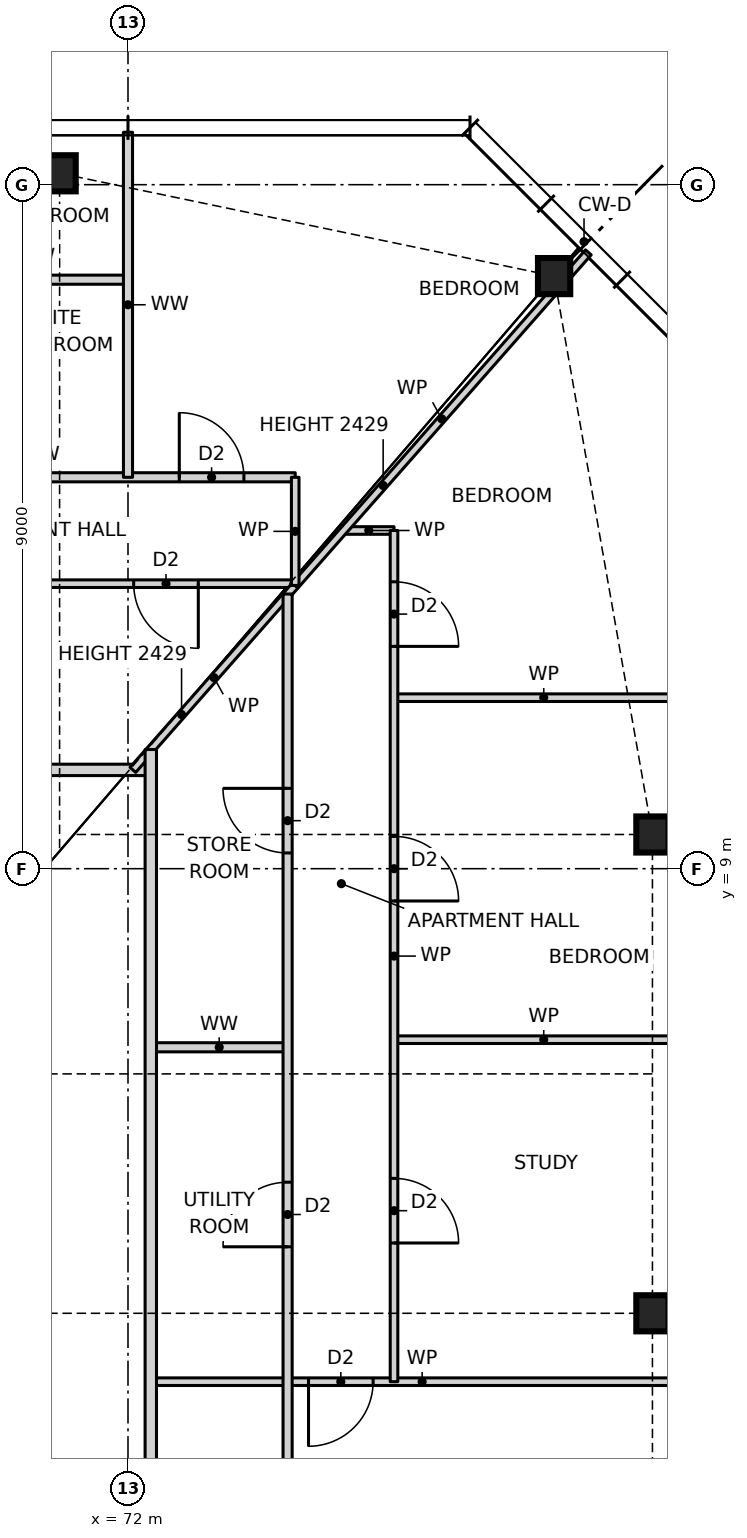
"""IFC4 building model, lengths in metres.
Left out: names, types, materials, properties, quantities, classifications, styles, units other than length and angle.
Written with IfcOpenShell. Run it as: python <this file> out.ifc"""

import sys

from ifc_helpers import new_model, si_unit, direction, frame, frame_2d, origin, origin_2d, place, context, subcontext, project, spatial, rectangle, i_section, extrude, element, fill, save


model = new_model("IFC4")
c1 = context("Model", 3, precision=1e-05, world=origin(), true_north=direction((0.0, 1.0)))
c2 = subcontext(c1, "Body", "Model", "MODEL_VIEW")
j1 = project(units=[si_unit("LENGTHUNIT", "METRE"), si_unit("PLANEANGLEUNIT", "RADIAN")], contexts=[c1])
p1 = place(None, origin())
s1 = spatial("IfcSite", under=j1, at=p1, CompositionType="ELEMENT")
p2 = place(p1, origin())
s2 = spatial("IfcBuilding", under=s1, at=p2, CompositionType="ELEMENT")
p3 = place(p2, frame((0.0, 0.0, 15.0)))
s3 = spatial("IfcBuildingStorey", under=s2, at=p3, CompositionType="ELEMENT", Elevation=15.0)
for number, where, z_axis, x_axis in (
    (1, (78.9, 3.15, 0.0), (0.0, 0.0, 1.0), (1.0, 0.0, 0.0)),
    (2, (78.9, 9.45, 0.0), (0.0, 0.0, 1.0), (1.0, 0.0, 0.0)),
    (3, (77.606, 16.797, 0.0), (0.0, 0.0, 1.0), (1.0, 0.0, 0.0)),
    (4, (71.1, 18.15, 0.0), (0.0, 0.0, 1.0), (1.0, 0.0, 0.0)),
):
    element("IfcColumn", number, at=place(p3, frame(where, z_axis=z_axis, x_axis=x_axis)), inside=s3, PredefinedType="COLUMN", context=c2, shape_type="SweptSolid", body=[
        extrude(i_section(OverallWidth=0.424, OverallDepth=0.475, WebThickness=0.048, FlangeThickness=0.077, at=origin_2d()), origin(), (0.0, 0.0, 1.0), 3.5),
    ])
p4 = place(p3, frame((72.3, 2.25, 0.0), z_axis=(0.0, 0.0, 1.0), x_axis=(1.0, 0.0, 0.0)))
e5 = element("IfcWall", 5, at=p4, inside=s3, PredefinedType="PARTITIONING", context=c2, shape_type="SweptSolid", body=[
    extrude(rectangle(XDim=7.14, YDim=0.1, at=frame_2d((3.57, 0.0))), origin(), (0.0, 0.0, 1.0), 3.27),
])
p5 = place(p4, frame((2.075, 0.0, 0.0)))
e6 = element("IfcOpeningElement", 6, at=p5, cuts=e5, PredefinedType="OPENING", context=c2, shape_type="SweptSolid", body=[
    extrude(rectangle(XDim=0.85, YDim=2.1, at=frame_2d((0.425, 1.05))), frame((0.0, 0.06, 0.0), z_axis=(0.0, -1.0, 0.0), x_axis=(1.0, 0.0, 0.0)), (0.0, 0.0, 1.0), 0.12),
])
p6 = place(p3, frame((72.3, 6.65, 0.0), z_axis=(0.0, 0.0, 1.0), x_axis=(1.0, 0.0, 0.0)))
e7 = element("IfcWall", 7, at=p6, inside=s3, PredefinedType="PARTITIONING", context=c2, shape_type="SweptSolid", body=[
    extrude(rectangle(XDim=1.8, YDim=0.12, at=frame_2d((0.9, 0.0))), origin(), (0.0, 0.0, 1.0), 3.27),
])
p7 = place(p3, frame((75.5, 6.75, 0.0), z_axis=(0.0, 0.0, 1.0), x_axis=(1.0, 0.0, 0.0)))
e8 = element("IfcWall", 8, at=p7, inside=s3, PredefinedType="PARTITIONING", context=c2, shape_type="SweptSolid", body=[
    extrude(rectangle(XDim=3.94, YDim=0.1, at=frame_2d((1.97, 0.0))), origin(), (0.0, 0.0, 1.0), 3.27),
])
p8 = place(p3, frame((53.7, 10.3, 0.0), z_axis=(0.0, 0.0, 1.0), x_axis=(1.0, 0.0, 0.0)))
e9 = element("IfcWall", 9, at=p8, inside=s3, PredefinedType="PARTITIONING", context=c2, shape_type="SweptSolid", body=[
    extrude(rectangle(XDim=18.6, YDim=0.15, at=frame_2d((9.3, 0.0))), origin(), (0.0, 0.0, 1.0), 3.27),
])
p9 = place(p8, frame((8.3, 0.0, 0.0)))
e10 = element("IfcOpeningElement", 10, at=p9, cuts=e9, PredefinedType="OPENING", context=c2, shape_type="SweptSolid", body=[
    extrude(rectangle(XDim=1.0, YDim=2.1, at=frame_2d((0.5, 1.05))), frame((0.0, 0.085, 0.0), z_axis=(0.0, -1.0, 0.0), x_axis=(1.0, 0.0, 0.0)), (0.0, 0.0, 1.0), 0.17),
])
p10 = place(p3, frame((75.5, 11.25, 0.0), z_axis=(0.0, 0.0, 1.0), x_axis=(1.0, 0.0, 0.0)))
e11 = element("IfcWall", 11, at=p10, inside=s3, PredefinedType="PARTITIONING", context=c2, shape_type="SweptSolid", body=[
    extrude(rectangle(XDim=3.94, YDim=0.1, at=frame_2d((1.97, 0.0))), origin(), (0.0, 0.0, 1.0), 3.27),
])
p11 = place(p3, frame((51.8, 12.75, 0.0), z_axis=(0.0, 0.0, 1.0), x_axis=(1.0, 0.0, 0.0)))
e12 = element("IfcWall", 12, at=p11, inside=s3, PredefinedType="PARTITIONING", context=c2, shape_type="SweptSolid", body=[
    extrude(rectangle(XDim=22.4, YDim=0.1, at=frame_2d((11.2, 0.0))), origin(), (0.0, 0.0, 1.0), 3.27),
])
p12 = place(p11, frame((13.475, 0.0, 0.0)))
e13 = element("IfcOpeningElement", 13, at=p12, cuts=e12, PredefinedType="OPENING", context=c2, shape_type="SweptSolid", body=[
    extrude(rectangle(XDim=0.85, YDim=2.1, at=frame_2d((0.425, 1.05))), frame((0.0, 0.06, 0.0), z_axis=(0.0, -1.0, 0.0), x_axis=(1.0, 0.0, 0.0)), (0.0, 0.0, 1.0), 0.12),
])
p13 = place(p11, frame((10.275, 0.0, 0.0)))
e14 = element("IfcOpeningElement", 14, at=p13, cuts=e12, PredefinedType="OPENING", context=c2, shape_type="SweptSolid", body=[
    extrude(rectangle(XDim=0.85, YDim=2.1, at=frame_2d((0.425, 1.05))), frame((0.0, 0.06, 0.0), z_axis=(0.0, -1.0, 0.0), x_axis=(1.0, 0.0, 0.0)), (0.0, 0.0, 1.0), 0.12),
])
p14 = place(p11, frame((16.925, 0.0, 0.0)))
e15 = element("IfcOpeningElement", 15, at=p14, cuts=e12, PredefinedType="OPENING", context=c2, shape_type="SweptSolid", body=[
    extrude(rectangle(XDim=0.85, YDim=2.1, at=frame_2d((0.425, 1.05))), frame((0.0, 0.06, 0.0), z_axis=(0.0, -1.0, 0.0), x_axis=(1.0, 0.0, 0.0)), (0.0, 0.0, 1.0), 0.12),
])
p15 = place(p11, frame((20.275, 0.0, 0.0)))
e16 = element("IfcOpeningElement", 16, at=p15, cuts=e12, PredefinedType="OPENING", context=c2, shape_type="SweptSolid", body=[
    extrude(rectangle(XDim=0.85, YDim=2.1, at=frame_2d((0.425, 1.05))), frame((0.0, 0.06, 0.0), z_axis=(0.0, -1.0, 0.0), x_axis=(1.0, 0.0, 0.0)), (0.0, 0.0, 1.0), 0.12),
])
p16 = place(p11, frame((4.625, 0.0, 0.0)))
e17 = element("IfcOpeningElement", 17, at=p16, cuts=e12, PredefinedType="OPENING", context=c2, shape_type="SweptSolid", body=[
    extrude(rectangle(XDim=0.85, YDim=2.1, at=frame_2d((0.425, 1.05))), frame((0.0, 0.06, 0.0), z_axis=(0.0, -1.0, 0.0), x_axis=(1.0, 0.0, 0.0)), (0.0, 0.0, 1.0), 0.12),
])
p17 = place(p11, frame((1.275, 0.0, 0.0)))
e18 = element("IfcOpeningElement", 18, at=p17, cuts=e12, PredefinedType="OPENING", context=c2, shape_type="SweptSolid", body=[
    extrude(rectangle(XDim=0.85, YDim=2.1, at=frame_2d((0.425, 1.05))), frame((0.0, 0.06, 0.0), z_axis=(0.0, -1.0, 0.0), x_axis=(1.0, 0.0, 0.0)), (0.0, 0.0, 1.0), 0.12),
])
p18 = place(p3, frame((74.836, 13.45, 0.0), z_axis=(0.0, 0.0, 1.0), x_axis=(1.0, 0.0, 0.0)))
e19 = element("IfcWall", 19, at=p18, inside=s3, PredefinedType="PARTITIONING", context=c2, shape_type="SweptSolid", body=[
    extrude(rectangle(XDim=0.664, YDim=0.1, at=frame_2d((0.332, 0.0))), origin(), (0.0, 0.0, 1.0), 3.27),
])
p19 = place(p3, frame((67.5, 14.15, 0.0), z_axis=(0.0, 0.0, 1.0), x_axis=(1.0, 0.0, 0.0)))
e20 = element("IfcWall", 20, at=p19, inside=s3, PredefinedType="PARTITIONING", context=c2, shape_type="SweptSolid", body=[
    extrude(rectangle(XDim=6.7, YDim=0.12, at=frame_2d((3.35, 0.0))), origin(), (0.0, 0.0, 1.0), 3.27),
])
p20 = place(p19, frame((0.625, 0.0, 0.0)))
e21 = element("IfcOpeningElement", 21, at=p20, cuts=e20, PredefinedType="OPENING", context=c2, shape_type="SweptSolid", body=[
    extrude(rectangle(XDim=0.85, YDim=2.1, at=frame_2d((0.425, 1.05))), frame((0.0, 0.07, 0.0), z_axis=(0.0, -1.0, 0.0), x_axis=(1.0, 0.0, 0.0)), (0.0, 0.0, 1.0), 0.14),
])
p21 = place(p19, frame((5.175, 0.0, 0.0)))
e22 = element("IfcOpeningElement", 22, at=p21, cuts=e20, PredefinedType="OPENING", context=c2, shape_type="SweptSolid", body=[
    extrude(rectangle(XDim=0.85, YDim=2.1, at=frame_2d((0.425, 1.05))), frame((0.0, 0.07, 0.0), z_axis=(0.0, -1.0, 0.0), x_axis=(1.0, 0.0, 0.0)), (0.0, 0.0, 1.0), 0.14),
])
p22 = place(p3, frame((69.6, 16.75, 0.0), z_axis=(0.0, 0.0, 1.0), x_axis=(1.0, 0.0, 0.0)))
e23 = element("IfcWall", 23, at=p22, inside=s3, PredefinedType="PARTITIONING", context=c2, shape_type="SweptSolid", body=[
    extrude(rectangle(XDim=2.4, YDim=0.12, at=frame_2d((1.2, 0.0))), origin(), (0.0, 0.0, 1.0), 3.27),
])
p23 = place(p3, frame((72.064, 10.3, 0.0), z_axis=(0.0, 0.0, 1.0), x_axis=(0.660667046586, 0.75067906162, 0.0)))
e24 = element("IfcWall", 24, at=p23, inside=s3, PredefinedType="PARTITIONING", context=c2, shape_type="SweptSolid", body=[
    extrude(rectangle(XDim=3.233, YDim=0.1, at=frame_2d((1.617, 0.0))), origin(), (0.0, 0.0, 1.0), 2.429),
])
p24 = place(p3, frame((74.2, 12.727, 0.0), z_axis=(0.0, 0.0, 1.0), x_axis=(0.660698595885, 0.750651294141, 0.0)))
e25 = element("IfcWall", 25, at=p24, inside=s3, PredefinedType="PARTITIONING", context=c2, shape_type="SweptSolid", body=[
    extrude(rectangle(XDim=5.838, YDim=0.1, at=frame_2d((2.919, 0.0))), origin(), (0.0, 0.0, 1.0), 2.429),
])
p25 = place(p3, frame((75.5, 2.25, 0.0), z_axis=(0.0, 0.0, 1.0), x_axis=(0.0, 1.0, 0.0)))
e26 = element("IfcWall", 26, at=p25, inside=s3, PredefinedType="PARTITIONING", context=c2, shape_type="SweptSolid", body=[
    extrude(rectangle(XDim=11.2, YDim=0.1, at=frame_2d((5.6, 0.0))), origin(), (0.0, 0.0, 1.0), 3.27),
])
p26 = place(p25, frame((1.825, 0.0, 0.0)))
e27 = element("IfcOpeningElement", 27, at=p26, cuts=e26, PredefinedType="OPENING", context=c2, shape_type="SweptSolid", body=[
    extrude(rectangle(XDim=0.85, YDim=2.1, at=frame_2d((0.425, 1.05))), frame((0.0, 0.06, 0.0), z_axis=(0.0, -1.0, 0.0), x_axis=(1.0, 0.0, 0.0)), (0.0, 0.0, 1.0), 0.12),
])
p27 = place(p25, frame((6.325, 0.0, 0.0)))
e28 = element("IfcOpeningElement", 28, at=p27, cuts=e26, PredefinedType="OPENING", context=c2, shape_type="SweptSolid", body=[
    extrude(rectangle(XDim=0.85, YDim=2.1, at=frame_2d((0.425, 1.05))), frame((0.0, 0.06, 0.0), z_axis=(0.0, -1.0, 0.0), x_axis=(1.0, 0.0, 0.0)), (0.0, 0.0, 1.0), 0.12),
])
p28 = place(p25, frame((9.675, 0.0, 0.0)))
e29 = element("IfcOpeningElement", 29, at=p28, cuts=e26, PredefinedType="OPENING", context=c2, shape_type="SweptSolid", body=[
    extrude(rectangle(XDim=0.85, YDim=2.1, at=frame_2d((0.425, 1.05))), frame((0.0, 0.06, 0.0), z_axis=(0.0, -1.0, 0.0), x_axis=(1.0, 0.0, 0.0)), (0.0, 0.0, 1.0), 0.12),
])
p29 = place(p3, frame((74.2, 12.727, 0.0), z_axis=(0.0, 0.0, 1.0), x_axis=(0.0, 1.0, 0.0)))
e30 = element("IfcWall", 30, at=p29, inside=s3, PredefinedType="PARTITIONING", context=c2, shape_type="SweptSolid", body=[
    extrude(rectangle(XDim=1.423, YDim=0.1, at=frame_2d((0.711, 0.0))), origin(), (0.0, 0.0, 1.0), 3.27),
])
p30 = place(p3, frame((74.1, -12.614, 0.0), z_axis=(0.0, 0.0, 1.0), x_axis=(0.0, 1.0, 0.0)))
e31 = element("IfcWall", 31, at=p30, inside=s3, PredefinedType="PARTITIONING", context=c2, shape_type="SweptSolid", body=[
    extrude(rectangle(XDim=25.228, YDim=0.12, at=frame_2d((12.614, 0.0))), origin(), (0.0, 0.0, 1.0), 3.27),
])
p31 = place(p30, frame((7.239, 0.0, 0.0)))
e32 = element("IfcOpeningElement", 32, at=p31, cuts=e31, PredefinedType="OPENING", context=c2, shape_type="SweptSolid", body=[
    extrude(rectangle(XDim=0.85, YDim=2.1, at=frame_2d((0.425, 1.05))), frame((0.0, 0.07, 0.0), z_axis=(0.0, -1.0, 0.0), x_axis=(1.0, 0.0, 0.0)), (0.0, 0.0, 1.0), 0.14),
])
p32 = place(p30, frame((10.439, 0.0, 0.0)))
e33 = element("IfcOpeningElement", 33, at=p32, cuts=e31, PredefinedType="OPENING", context=c2, shape_type="SweptSolid", body=[
    extrude(rectangle(XDim=0.85, YDim=2.1, at=frame_2d((0.425, 1.05))), frame((0.0, 0.07, 0.0), z_axis=(0.0, -1.0, 0.0), x_axis=(1.0, 0.0, 0.0)), (0.0, 0.0, 1.0), 0.14),
])
p33 = place(p30, frame((2.507, 0.0, 0.0)))
e34 = element("IfcOpeningElement", 34, at=p33, cuts=e31, PredefinedType="OPENING", context=c2, shape_type="SweptSolid", body=[
    extrude(rectangle(XDim=0.85, YDim=2.1, at=frame_2d((0.425, 1.05))), frame((0.0, 0.07, 0.0), z_axis=(0.0, -1.0, 0.0), x_axis=(1.0, 0.0, 0.0)), (0.0, 0.0, 1.0), 0.14),
])
p34 = place(p30, frame((16.639, 0.0, 0.0)))
e35 = element("IfcOpeningElement", 35, at=p34, cuts=e31, PredefinedType="OPENING", context=c2, shape_type="SweptSolid", body=[
    extrude(rectangle(XDim=0.85, YDim=2.1, at=frame_2d((0.425, 1.05))), frame((0.0, 0.07, 0.0), z_axis=(0.0, -1.0, 0.0), x_axis=(1.0, 0.0, 0.0)), (0.0, 0.0, 1.0), 0.14),
])
p35 = place(p30, frame((21.821, 0.0, 0.0)))
e36 = element("IfcOpeningElement", 36, at=p35, cuts=e31, PredefinedType="OPENING", context=c2, shape_type="SweptSolid", body=[
    extrude(rectangle(XDim=0.85, YDim=2.1, at=frame_2d((0.425, 1.05))), frame((0.0, 0.07, 0.0), z_axis=(0.0, -1.0, 0.0), x_axis=(1.0, 0.0, 0.0)), (0.0, 0.0, 1.0), 0.14),
])
p36 = place(p3, frame((72.3, -10.9, 0.0), z_axis=(0.0, 0.0, 1.0), x_axis=(0.0, 1.0, 0.0)))
e37 = element("IfcWall", 37, at=p36, inside=s3, PredefinedType="PARTITIONING", context=c2, shape_type="SweptSolid", body=[
    extrude(rectangle(XDim=21.468, YDim=0.15, at=frame_2d((10.734, 0.0))), origin(), (0.0, 0.0, 1.0), 3.27),
])
p37 = place(p36, frame((8.65, 0.0, 0.0)))
e38 = element("IfcOpeningElement", 38, at=p37, cuts=e37, PredefinedType="OPENING", context=c2, shape_type="SweptSolid", body=[
    extrude(rectangle(XDim=1.0, YDim=2.1, at=frame_2d((0.5, 1.05))), frame((0.0, 0.085, 0.0), z_axis=(0.0, -1.0, 0.0), x_axis=(1.0, 0.0, 0.0)), (0.0, 0.0, 1.0), 0.17),
])
p38 = place(p3, frame((72.0, 14.15, 0.0), z_axis=(0.0, 0.0, 1.0), x_axis=(0.0, 1.0, 0.0)))
e39 = element("IfcWall", 39, at=p38, inside=s3, PredefinedType="PARTITIONING", context=c2, shape_type="SweptSolid", body=[
    extrude(rectangle(XDim=4.54, YDim=0.12, at=frame_2d((2.27, 0.0))), origin(), (0.0, 0.0, 1.0), 3.27),
])
p39 = place(p5, frame((0.85, 0.0, 0.0), z_axis=(0.0, 0.0, 1.0), x_axis=(-1.0, 0.0, 0.0)))
e40 = element("IfcDoor", 40, at=p39, inside=s3, OperationType="SINGLE_SWING_RIGHT", PredefinedType="DOOR", context=c2, shape_type="SweptSolid", body=[
    extrude(rectangle(XDim=0.85, YDim=2.1, at=frame_2d((0.425, 1.05))), frame((0.0, 0.025, 0.0), z_axis=(0.0, -1.0, 0.0), x_axis=(1.0, 0.0, 0.0)), (0.0, 0.0, 1.0), 0.05),
])
fill(e6, e40)
p40 = place(p26, frame((0.85, 0.0, 0.0), z_axis=(0.0, 0.0, 1.0), x_axis=(-1.0, 0.0, 0.0)))
e41 = element("IfcDoor", 41, at=p40, inside=s3, OperationType="SINGLE_SWING_RIGHT", PredefinedType="DOOR", context=c2, shape_type="SweptSolid", body=[
    extrude(rectangle(XDim=0.85, YDim=2.1, at=frame_2d((0.425, 1.05))), frame((0.0, 0.025, 0.0), z_axis=(0.0, -1.0, 0.0), x_axis=(1.0, 0.0, 0.0)), (0.0, 0.0, 1.0), 0.05),
])
fill(e27, e41)
p41 = place(p27, frame((0.85, 0.0, 0.0), z_axis=(0.0, 0.0, 1.0), x_axis=(-1.0, 0.0, 0.0)))
e42 = element("IfcDoor", 42, at=p41, inside=s3, OperationType="SINGLE_SWING_RIGHT", PredefinedType="DOOR", context=c2, shape_type="SweptSolid", body=[
    extrude(rectangle(XDim=0.85, YDim=2.1, at=frame_2d((0.425, 1.05))), frame((0.0, 0.025, 0.0), z_axis=(0.0, -1.0, 0.0), x_axis=(1.0, 0.0, 0.0)), (0.0, 0.0, 1.0), 0.05),
])
fill(e28, e42)
p42 = place(p28, frame((0.85, 0.0, 0.0), z_axis=(0.0, 0.0, 1.0), x_axis=(-1.0, 0.0, 0.0)))
e43 = element("IfcDoor", 43, at=p42, inside=s3, OperationType="SINGLE_SWING_RIGHT", PredefinedType="DOOR", context=c2, shape_type="SweptSolid", body=[
    extrude(rectangle(XDim=0.85, YDim=2.1, at=frame_2d((0.425, 1.05))), frame((0.0, 0.025, 0.0), z_axis=(0.0, -1.0, 0.0), x_axis=(1.0, 0.0, 0.0)), (0.0, 0.0, 1.0), 0.05),
])
fill(e29, e43)
p43 = place(p34, origin())
e44 = element("IfcDoor", 44, at=p43, inside=s3, OperationType="SINGLE_SWING_LEFT", PredefinedType="DOOR", context=c2, shape_type="SweptSolid", body=[
    extrude(rectangle(XDim=0.85, YDim=2.1, at=frame_2d((0.425, 1.05))), frame((0.0, 0.025, 0.0), z_axis=(0.0, -1.0, 0.0), x_axis=(1.0, 0.0, 0.0)), (0.0, 0.0, 1.0), 0.05),
])
fill(e35, e44)
p44 = place(p35, origin())
e45 = element("IfcDoor", 45, at=p44, inside=s3, OperationType="SINGLE_SWING_RIGHT", PredefinedType="DOOR", context=c2, shape_type="SweptSolid", body=[
    extrude(rectangle(XDim=0.85, YDim=2.1, at=frame_2d((0.425, 1.05))), frame((0.0, 0.025, 0.0), z_axis=(0.0, -1.0, 0.0), x_axis=(1.0, 0.0, 0.0)), (0.0, 0.0, 1.0), 0.05),
])
fill(e36, e45)
p45 = place(p21, origin())
e46 = element("IfcDoor", 46, at=p45, inside=s3, OperationType="SINGLE_SWING_LEFT", PredefinedType="DOOR", context=c2, shape_type="SweptSolid", body=[
    extrude(rectangle(XDim=0.85, YDim=2.1, at=frame_2d((0.425, 1.05))), frame((0.0, 0.025, 0.0), z_axis=(0.0, -1.0, 0.0), x_axis=(1.0, 0.0, 0.0)), (0.0, 0.0, 1.0), 0.05),
])
fill(e22, e46)
p46 = place(p15, frame((0.85, 0.0, 0.0), z_axis=(0.0, 0.0, 1.0), x_axis=(-1.0, 0.0, 0.0)))
e47 = element("IfcDoor", 47, at=p46, inside=s3, OperationType="SINGLE_SWING_LEFT", PredefinedType="DOOR", context=c2, shape_type="SweptSolid", body=[
    extrude(rectangle(XDim=0.85, YDim=2.1, at=frame_2d((0.425, 1.05))), frame((0.0, 0.025, 0.0), z_axis=(0.0, -1.0, 0.0), x_axis=(1.0, 0.0, 0.0)), (0.0, 0.0, 1.0), 0.05),
])
fill(e16, e47)
save(model, sys.argv[1])
